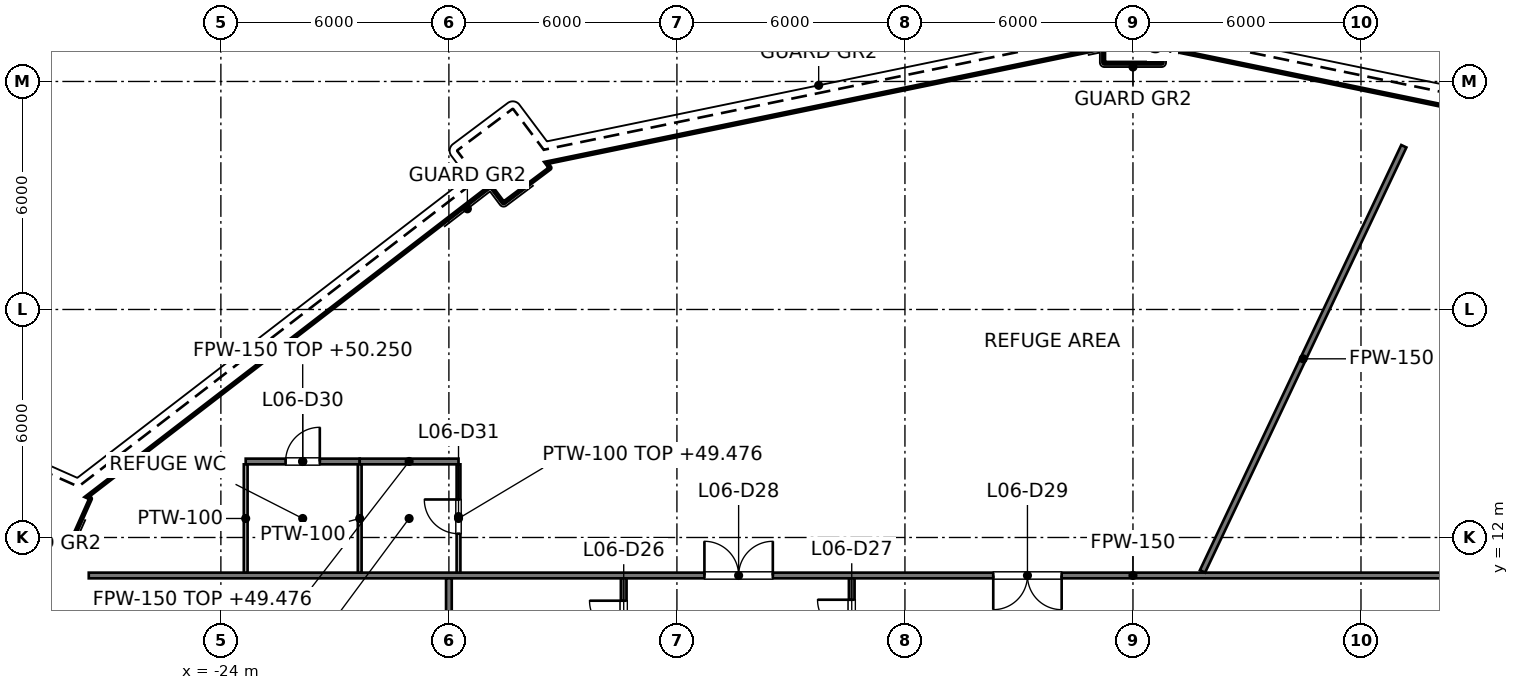
"""IFC4 building model, lengths in metres.
Left out: names, types, materials, properties, quantities, classifications, styles, units other than length and angle.
Written with IfcOpenShell. Run it as: python <this file> out.ifc"""

import sys

from ifc_helpers import new_model, si_unit, direction, frame, frame_2d, origin, place, context, subcontext, project, spatial, rectangle, extrude, element, fill, save


model = new_model("IFC4")
c1 = context("Model", 3, precision=1e-05, world=origin(), true_north=direction((0.0, 1.0)))
c2 = subcontext(c1, "Body", "Model", "MODEL_VIEW")
j1 = project(units=[si_unit("LENGTHUNIT", "METRE"), si_unit("PLANEANGLEUNIT", "RADIAN")], contexts=[c1])
p1 = place(None, origin())
s1 = spatial("IfcSite", under=j1, at=p1, CompositionType="ELEMENT")
p2 = place(p1, origin())
s2 = spatial("IfcBuilding", under=s1, at=p2, CompositionType="ELEMENT")
p3 = place(p2, frame((0.0, 0.0, 44.0)))
s3 = spatial("IfcBuildingStorey", under=s2, at=p3, CompositionType="ELEMENT", Elevation=44.0)
p4 = place(p3, frame((-27.476, 11.0, 0.0), z_axis=(0.0, 0.0, 1.0), x_axis=(1.0, 0.0, 0.0)))
e1 = element("IfcWall", 1, at=p4, inside=s3, PredefinedType="PARTITIONING", context=c2, shape_type="SweptSolid", body=[
    extrude(rectangle(XDim=54.953, YDim=0.15, at=frame_2d((27.476, 0.0))), origin(), (0.0, 0.0, 1.0), 5.327),
])
p5 = place(p4, frame((16.2, 0.0, 0.0)))
e2 = element("IfcOpeningElement", 2, at=p5, cuts=e1, PredefinedType="OPENING", context=c2, shape_type="SweptSolid", body=[
    extrude(rectangle(XDim=1.8, YDim=2.1, at=frame_2d((0.9, 1.05))), frame((0.0, 0.075, 0.0), z_axis=(0.0, -1.0, 0.0), x_axis=(1.0, 0.0, 0.0)), (0.0, 0.0, 1.0), 0.15),
])
p6 = place(p4, frame((23.8, 0.0, 0.0)))
e3 = element("IfcOpeningElement", 3, at=p6, cuts=e1, PredefinedType="OPENING", context=c2, shape_type="SweptSolid", body=[
    extrude(rectangle(XDim=1.8, YDim=2.1, at=frame_2d((0.9, 1.05))), frame((0.0, 0.075, 0.0), z_axis=(0.0, -1.0, 0.0), x_axis=(1.0, 0.0, 0.0)), (0.0, 0.0, 1.0), 0.15),
])
p7 = place(p4, frame((36.55, 0.0, 0.0)))
e4 = element("IfcOpeningElement", 4, at=p7, cuts=e1, PredefinedType="OPENING", context=c2, shape_type="SweptSolid", body=[
    extrude(rectangle(XDim=1.8, YDim=2.1, at=frame_2d((0.9, 1.05))), frame((0.0, 0.075, 0.0), z_axis=(0.0, -1.0, 0.0), x_axis=(1.0, 0.0, 0.0)), (0.0, 0.0, 1.0), 0.15),
])
p8 = place(p3, frame((-18.0, -10.925, 0.0), z_axis=(0.0, 0.0, 1.0), x_axis=(0.0, 1.0, 0.0)))
e5 = element("IfcWall", 5, at=p8, inside=s3, PredefinedType="PARTITIONING", context=c2, shape_type="SweptSolid", body=[
    extrude(rectangle(XDim=21.85, YDim=0.15, at=frame_2d((10.925, 0.0))), origin(), (0.0, 0.0, 1.0), 5.327),
])
p9 = place(p8, frame((4.95, 0.0, 0.0)))
e6 = element("IfcOpeningElement", 6, at=p9, cuts=e5, PredefinedType="OPENING", context=c2, shape_type="SweptSolid", body=[
    extrude(rectangle(XDim=1.0, YDim=2.1, at=frame_2d((0.5, 1.05))), frame((0.0, 0.075, 0.0), z_axis=(0.0, -1.0, 0.0), x_axis=(1.0, 0.0, 0.0)), (0.0, 0.0, 1.0), 0.15),
])
p10 = place(p8, frame((15.925, 0.0, 0.0)))
e7 = element("IfcOpeningElement", 7, at=p10, cuts=e5, PredefinedType="OPENING", context=c2, shape_type="SweptSolid", body=[
    extrude(rectangle(XDim=1.0, YDim=2.1, at=frame_2d((0.5, 1.05))), frame((0.0, 0.075, 0.0), z_axis=(0.0, -1.0, 0.0), x_axis=(1.0, 0.0, 0.0)), (0.0, 0.0, 1.0), 0.15),
])
p11 = place(p3, frame((1.829, 11.107, 0.0), z_axis=(0.0, 0.0, 1.0), x_axis=(0.427950706934, 0.903802075918, 0.0)))
e8 = element("IfcWall", 8, at=p11, inside=s3, PredefinedType="PARTITIONING", context=c2, shape_type="SweptSolid", body=[
    extrude(rectangle(XDim=12.38, YDim=0.15, at=frame_2d((6.19, 0.0))), origin(), (0.0, 0.0, 1.0), 5.395),
])
p12 = place(p3, frame((-13.4, 7.948, 0.0), z_axis=(0.0, 0.0, 1.0), x_axis=(0.0, 1.0, 0.0)))
e9 = element("IfcWall", 9, at=p12, inside=s3, PredefinedType="PARTITIONING", context=c2, shape_type="SweptSolid", body=[
    extrude(rectangle(XDim=2.978, YDim=0.15, at=frame_2d((1.489, 0.0))), origin(), (0.0, 0.0, 1.0), 5.476),
])
p13 = place(p12, frame((0.589, 0.0, 0.0)))
e10 = element("IfcOpeningElement", 10, at=p13, cuts=e9, PredefinedType="OPENING", context=c2, shape_type="SweptSolid", body=[
    extrude(rectangle(XDim=1.8, YDim=2.1, at=frame_2d((0.9, 1.05))), frame((0.0, 0.075, 0.0), z_axis=(0.0, -1.0, 0.0), x_axis=(1.0, 0.0, 0.0)), (0.0, 0.0, 1.0), 0.15),
])
p14 = place(p3, frame((-7.4, 8.0, 0.0), z_axis=(0.0, 0.0, 1.0), x_axis=(0.0, 1.0, 0.0)))
e11 = element("IfcWall", 11, at=p14, inside=s3, PredefinedType="PARTITIONING", context=c2, shape_type="SweptSolid", body=[
    extrude(rectangle(XDim=2.925, YDim=0.15, at=frame_2d((1.462, 0.0))), origin(), (0.0, 0.0, 1.0), 5.327),
])
p15 = place(p14, frame((0.562, 0.0, 0.0)))
e12 = element("IfcOpeningElement", 12, at=p15, cuts=e11, PredefinedType="OPENING", context=c2, shape_type="SweptSolid", body=[
    extrude(rectangle(XDim=1.8, YDim=2.1, at=frame_2d((0.9, 1.05))), frame((0.0, 0.075, 0.0), z_axis=(0.0, -1.0, 0.0), x_axis=(1.0, 0.0, 0.0)), (0.0, 0.0, 1.0), 0.15),
])
p16 = place(p3, frame((-23.347, 14.0, 0.0), z_axis=(0.0, 0.0, 1.0), x_axis=(1.0, 0.0, 0.0)))
e13 = element("IfcWall", 13, at=p16, inside=s3, PredefinedType="PARTITIONING", context=c2, shape_type="SweptSolid", body=[
    extrude(rectangle(XDim=3.0, YDim=0.15, at=frame_2d((1.5, 0.0))), origin(), (0.0, 0.0, 1.0), 6.25),
])
p17 = place(p16, frame((1.05, 0.0, 0.0)))
e14 = element("IfcOpeningElement", 14, at=p17, cuts=e13, PredefinedType="OPENING", context=c2, shape_type="SweptSolid", body=[
    extrude(rectangle(XDim=0.9, YDim=2.1, at=frame_2d((0.45, 1.05))), frame((0.0, 0.075, 0.0), z_axis=(0.0, -1.0, 0.0), x_axis=(1.0, 0.0, 0.0)), (0.0, 0.0, 1.0), 0.15),
])
p18 = place(p3, frame((-20.347, 14.0, 0.0), z_axis=(0.0, 0.0, 1.0), x_axis=(1.0, 0.0, 0.0)))
e15 = element("IfcWall", 15, at=p18, inside=s3, PredefinedType="PARTITIONING", context=c2, shape_type="SweptSolid", body=[
    extrude(rectangle(XDim=2.6, YDim=0.15, at=frame_2d((1.3, 0.0))), origin(), (0.0, 0.0, 1.0), 5.476),
])
for number, where, z_axis, x_axis in (
    (16, (-23.347, 11.075, 0.0), (0.0, 0.0, 1.0), (0.0, 1.0, 0.0)),
    (17, (-20.347, 11.075, 0.0), (0.0, 0.0, 1.0), (0.0, 1.0, 0.0)),
):
    element("IfcWall", number, at=place(p3, frame(where, z_axis=z_axis, x_axis=x_axis)), inside=s3, PredefinedType="PARTITIONING", context=c2, shape_type="SweptSolid", body=[
        extrude(rectangle(XDim=2.85, YDim=0.1, at=frame_2d((1.425, 0.0))), origin(), (0.0, 0.0, 1.0), 5.627),
    ])
p19 = place(p3, frame((-17.747, 11.075, 0.0), z_axis=(0.0, 0.0, 1.0), x_axis=(0.0, 1.0, 0.0)))
e18 = element("IfcWall", 18, at=p19, inside=s3, PredefinedType="PARTITIONING", context=c2, shape_type="SweptSolid", body=[
    extrude(rectangle(XDim=2.85, YDim=0.1, at=frame_2d((1.425, 0.0))), origin(), (0.0, 0.0, 1.0), 5.476),
])
p20 = place(p19, frame((1.025, 0.0, 0.0)))
e19 = element("IfcOpeningElement", 19, at=p20, cuts=e18, PredefinedType="OPENING", context=c2, shape_type="SweptSolid", body=[
    extrude(rectangle(XDim=0.9, YDim=2.1, at=frame_2d((0.45, 1.05))), frame((0.0, 0.05, 0.0), z_axis=(0.0, -1.0, 0.0), x_axis=(1.0, 0.0, 0.0)), (0.0, 0.0, 1.0), 0.1),
])
p21 = place(p13, origin())
e20 = element("IfcDoor", 20, at=p21, inside=s3, OperationType="DOUBLE_DOOR_SINGLE_SWING", PredefinedType="DOOR", context=c2, shape_type="SweptSolid", body=[
    extrude(rectangle(XDim=1.8, YDim=2.1, at=frame_2d((0.9, 1.05))), frame((0.0, 0.025, 0.0), z_axis=(0.0, -1.0, 0.0), x_axis=(1.0, 0.0, 0.0)), (0.0, 0.0, 1.0), 0.05),
])
fill(e10, e20)
p22 = place(p15, origin())
e21 = element("IfcDoor", 21, at=p22, inside=s3, OperationType="DOUBLE_DOOR_SINGLE_SWING", PredefinedType="DOOR", context=c2, shape_type="SweptSolid", body=[
    extrude(rectangle(XDim=1.8, YDim=2.1, at=frame_2d((0.9, 1.05))), frame((0.0, 0.025, 0.0), z_axis=(0.0, -1.0, 0.0), x_axis=(1.0, 0.0, 0.0)), (0.0, 0.0, 1.0), 0.05),
])
fill(e12, e21)
p23 = place(p5, origin())
e22 = element("IfcDoor", 22, at=p23, inside=s3, OperationType="DOUBLE_DOOR_SINGLE_SWING", PredefinedType="DOOR", context=c2, shape_type="SweptSolid", body=[
    extrude(rectangle(XDim=1.8, YDim=2.1, at=frame_2d((0.9, 1.05))), frame((0.0, 0.025, 0.0), z_axis=(0.0, -1.0, 0.0), x_axis=(1.0, 0.0, 0.0)), (0.0, 0.0, 1.0), 0.05),
])
fill(e2, e22)
p24 = place(p6, origin())
e23 = element("IfcDoor", 23, at=p24, inside=s3, OperationType="DOUBLE_DOOR_SINGLE_SWING", PredefinedType="DOOR", context=c2, shape_type="SweptSolid", body=[
    extrude(rectangle(XDim=1.8, YDim=2.1, at=frame_2d((0.9, 1.05))), frame((0.0, 0.025, 0.0), z_axis=(0.0, -1.0, 0.0), x_axis=(1.0, 0.0, 0.0)), (0.0, 0.0, 1.0), 0.05),
])
fill(e3, e23)
p25 = place(p17, origin())
e24 = element("IfcDoor", 24, at=p25, inside=s3, OperationType="SINGLE_SWING_RIGHT", PredefinedType="DOOR", context=c2, shape_type="SweptSolid", body=[
    extrude(rectangle(XDim=0.9, YDim=2.1, at=frame_2d((0.45, 1.05))), frame((0.0, 0.025, 0.0), z_axis=(0.0, -1.0, 0.0), x_axis=(1.0, 0.0, 0.0)), (0.0, 0.0, 1.0), 0.05),
])
fill(e14, e24)
p26 = place(p20, origin())
e25 = element("IfcDoor", 25, at=p26, inside=s3, OperationType="SINGLE_SWING_RIGHT", PredefinedType="DOOR", context=c2, shape_type="SweptSolid", body=[
    extrude(rectangle(XDim=0.9, YDim=2.1, at=frame_2d((0.45, 1.05))), frame((0.0, 0.025, 0.0), z_axis=(0.0, -1.0, 0.0), x_axis=(1.0, 0.0, 0.0)), (0.0, 0.0, 1.0), 0.05),
])
fill(e19, e25)
save(model, sys.argv[1])
